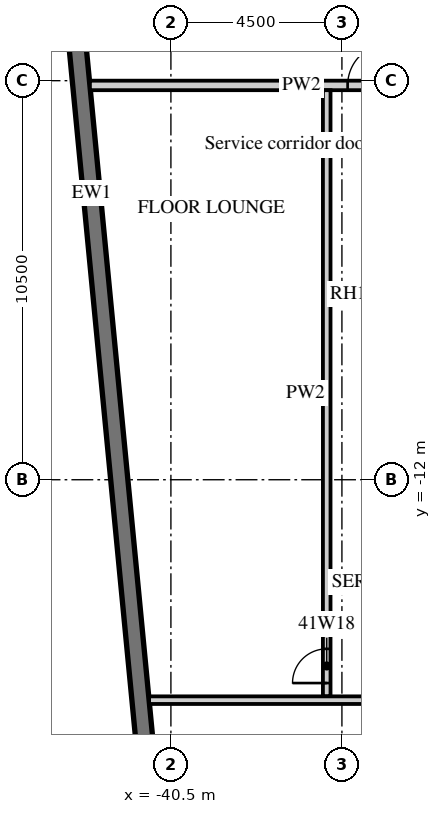
"""IFC4 building model, lengths in metres.
Left out: names, types, materials, properties, quantities, classifications, styles, units other than length and angle.
Written with IfcOpenShell. Run it as: python <this file> out.ifc"""

import sys

from ifc_helpers import new_model, si_unit, direction, frame, frame_2d, origin, place, context, subcontext, project, spatial, rectangle, extrude, element, fill, save


model = new_model("IFC4")
c1 = context("Model", 3, precision=1e-05, world=origin(), true_north=direction((0.0, 1.0)))
c2 = subcontext(c1, "Body", "Model", "MODEL_VIEW")
j1 = project(units=[si_unit("LENGTHUNIT", "METRE"), si_unit("PLANEANGLEUNIT", "RADIAN")], contexts=[c1])
p1 = place(None, origin())
s1 = spatial("IfcSite", under=j1, at=p1, CompositionType="ELEMENT")
p2 = place(p1, origin())
s2 = spatial("IfcBuilding", under=s1, at=p2, CompositionType="ELEMENT")
p3 = place(p2, frame((0.0, 0.0, 176.8)))
s3 = spatial("IfcBuildingStorey", under=s2, at=p3, CompositionType="ELEMENT", Elevation=176.8)
p4 = place(p3, frame((-44.214, 12.466, 0.0), z_axis=(0.0, 0.0, 1.0), x_axis=(0.095847314626, -0.995396047952, 0.0)))
e1 = element("IfcWall", 1, at=p4, inside=s3, PredefinedType="SOLIDWALL", context=c2, shape_type="SweptSolid", body=[
    extrude(rectangle(XDim=34.0, YDim=0.45, at=frame_2d((17.0, 0.0))), origin(), (0.0, 0.0, 1.0), 3.02),
])
p5 = place(p4, frame((2.865, 0.0, 0.45)))
e2 = element("IfcOpeningElement", 2, at=p5, cuts=e1, PredefinedType="OPENING", context=c2, shape_type="SweptSolid", body=[
    extrude(rectangle(XDim=3.3, YDim=2.25, at=frame_2d((1.65, 1.125))), frame((0.0, 0.235, 0.0), z_axis=(0.0, -1.0, 0.0), x_axis=(1.0, 0.0, 0.0)), (0.0, 0.0, 1.0), 0.47),
])
p6 = place(p4, frame((7.386, 0.0, 0.45)))
e3 = element("IfcOpeningElement", 3, at=p6, cuts=e1, PredefinedType="OPENING", context=c2, shape_type="SweptSolid", body=[
    extrude(rectangle(XDim=3.3, YDim=2.25, at=frame_2d((1.65, 1.125))), frame((0.0, 0.235, 0.0), z_axis=(0.0, -1.0, 0.0), x_axis=(1.0, 0.0, 0.0)), (0.0, 0.0, 1.0), 0.47),
])
p7 = place(p3, frame((-42.632, -1.625, 0.0), z_axis=(0.0, 0.0, 1.0), x_axis=(1.0, 0.0, 0.0)))
e4 = element("IfcWall", 4, at=p7, inside=s3, PredefinedType="PARTITIONING", context=c2, shape_type="SweptSolid", body=[
    extrude(rectangle(XDim=11.132, YDim=0.25, at=frame_2d((5.566, 0.0))), origin(), (0.0, 0.0, 1.0), 3.02),
])
p8 = place(p7, frame((9.207, 0.0, 0.0)))
e5 = element("IfcOpeningElement", 5, at=p8, cuts=e4, PredefinedType="OPENING", context=c2, shape_type="SweptSolid", body=[
    extrude(rectangle(XDim=1.3, YDim=2.1, at=frame_2d((0.65, 1.05))), frame((0.0, 0.135, 0.0), z_axis=(0.0, -1.0, 0.0), x_axis=(1.0, 0.0, 0.0)), (0.0, 0.0, 1.0), 0.27),
])
p9 = place(p7, frame((6.781, 0.0, 0.0)))
e6 = element("IfcOpeningElement", 6, at=p9, cuts=e4, PredefinedType="OPENING", context=c2, shape_type="SweptSolid", body=[
    extrude(rectangle(XDim=1.1, YDim=2.1, at=frame_2d((0.55, 1.05))), frame((0.0, 0.135, 0.0), z_axis=(0.0, -1.0, 0.0), x_axis=(1.0, 0.0, 0.0)), (0.0, 0.0, 1.0), 0.27),
])
p10 = place(p3, frame((-36.4, -17.7, 0.0), z_axis=(0.0, 0.0, 1.0), x_axis=(0.0, 1.0, 0.0)))
e7 = element("IfcWall", 7, at=p10, inside=s3, PredefinedType="PARTITIONING", context=c2, shape_type="SweptSolid", body=[
    extrude(rectangle(XDim=15.95, YDim=0.2, at=frame_2d((7.975, 0.0))), origin(), (0.0, 0.0, 1.0), 3.02),
])
p11 = place(p10, frame((0.35, 0.0, 0.0)))
e8 = element("IfcOpeningElement", 8, at=p11, cuts=e7, PredefinedType="OPENING", context=c2, shape_type="SweptSolid", body=[
    extrude(rectangle(XDim=0.9, YDim=2.1, at=frame_2d((0.45, 1.05))), frame((0.0, 0.11, 0.0), z_axis=(0.0, -1.0, 0.0), x_axis=(1.0, 0.0, 0.0)), (0.0, 0.0, 1.0), 0.22),
])
p12 = place(p3, frame((-41.074, -17.8, 0.0), z_axis=(0.0, 0.0, 1.0), x_axis=(1.0, 0.0, 0.0)))
e9 = element("IfcWall", 9, at=p12, inside=s3, PredefinedType="PARTITIONING", context=c2, shape_type="SweptSolid", body=[
    extrude(rectangle(XDim=27.474, YDim=0.2, at=frame_2d((13.737, 0.0))), origin(), (0.0, 0.0, 1.0), 3.02),
])
p13 = place(p12, frame((9.962, 0.0, 0.0)))
e10 = element("IfcOpeningElement", 10, at=p13, cuts=e9, PredefinedType="OPENING", context=c2, shape_type="SweptSolid", body=[
    extrude(rectangle(XDim=0.9, YDim=2.1, at=frame_2d((0.45, 1.05))), frame((0.0, 0.11, 0.0), z_axis=(0.0, -1.0, 0.0), x_axis=(1.0, 0.0, 0.0)), (0.0, 0.0, 1.0), 0.22),
])
p14 = place(p12, frame((18.262, 0.0, 0.0)))
e11 = element("IfcOpeningElement", 11, at=p14, cuts=e9, PredefinedType="OPENING", context=c2, shape_type="SweptSolid", body=[
    extrude(rectangle(XDim=0.9, YDim=2.1, at=frame_2d((0.45, 1.05))), frame((0.0, 0.11, 0.0), z_axis=(0.0, -1.0, 0.0), x_axis=(1.0, 0.0, 0.0)), (0.0, 0.0, 1.0), 0.22),
])
p15 = place(p9, origin())
e12 = element("IfcDoor", 12, at=p15, inside=s3, OperationType="SINGLE_SWING_RIGHT", PredefinedType="DOOR", context=c2, shape_type="SweptSolid", body=[
    extrude(rectangle(XDim=1.1, YDim=2.1, at=frame_2d((0.55, 1.05))), frame((0.0, 0.025, 0.0), z_axis=(0.0, -1.0, 0.0), x_axis=(1.0, 0.0, 0.0)), (0.0, 0.0, 1.0), 0.05),
])
fill(e6, e12)
p16 = place(p11, origin())
e13 = element("IfcDoor", 13, at=p16, inside=s3, OperationType="SINGLE_SWING_LEFT", PredefinedType="DOOR", context=c2, shape_type="SweptSolid", body=[
    extrude(rectangle(XDim=0.9, YDim=2.1, at=frame_2d((0.45, 1.05))), frame((0.0, 0.025, 0.0), z_axis=(0.0, -1.0, 0.0), x_axis=(1.0, 0.0, 0.0)), (0.0, 0.0, 1.0), 0.05),
])
fill(e8, e13)
save(model, sys.argv[1])
